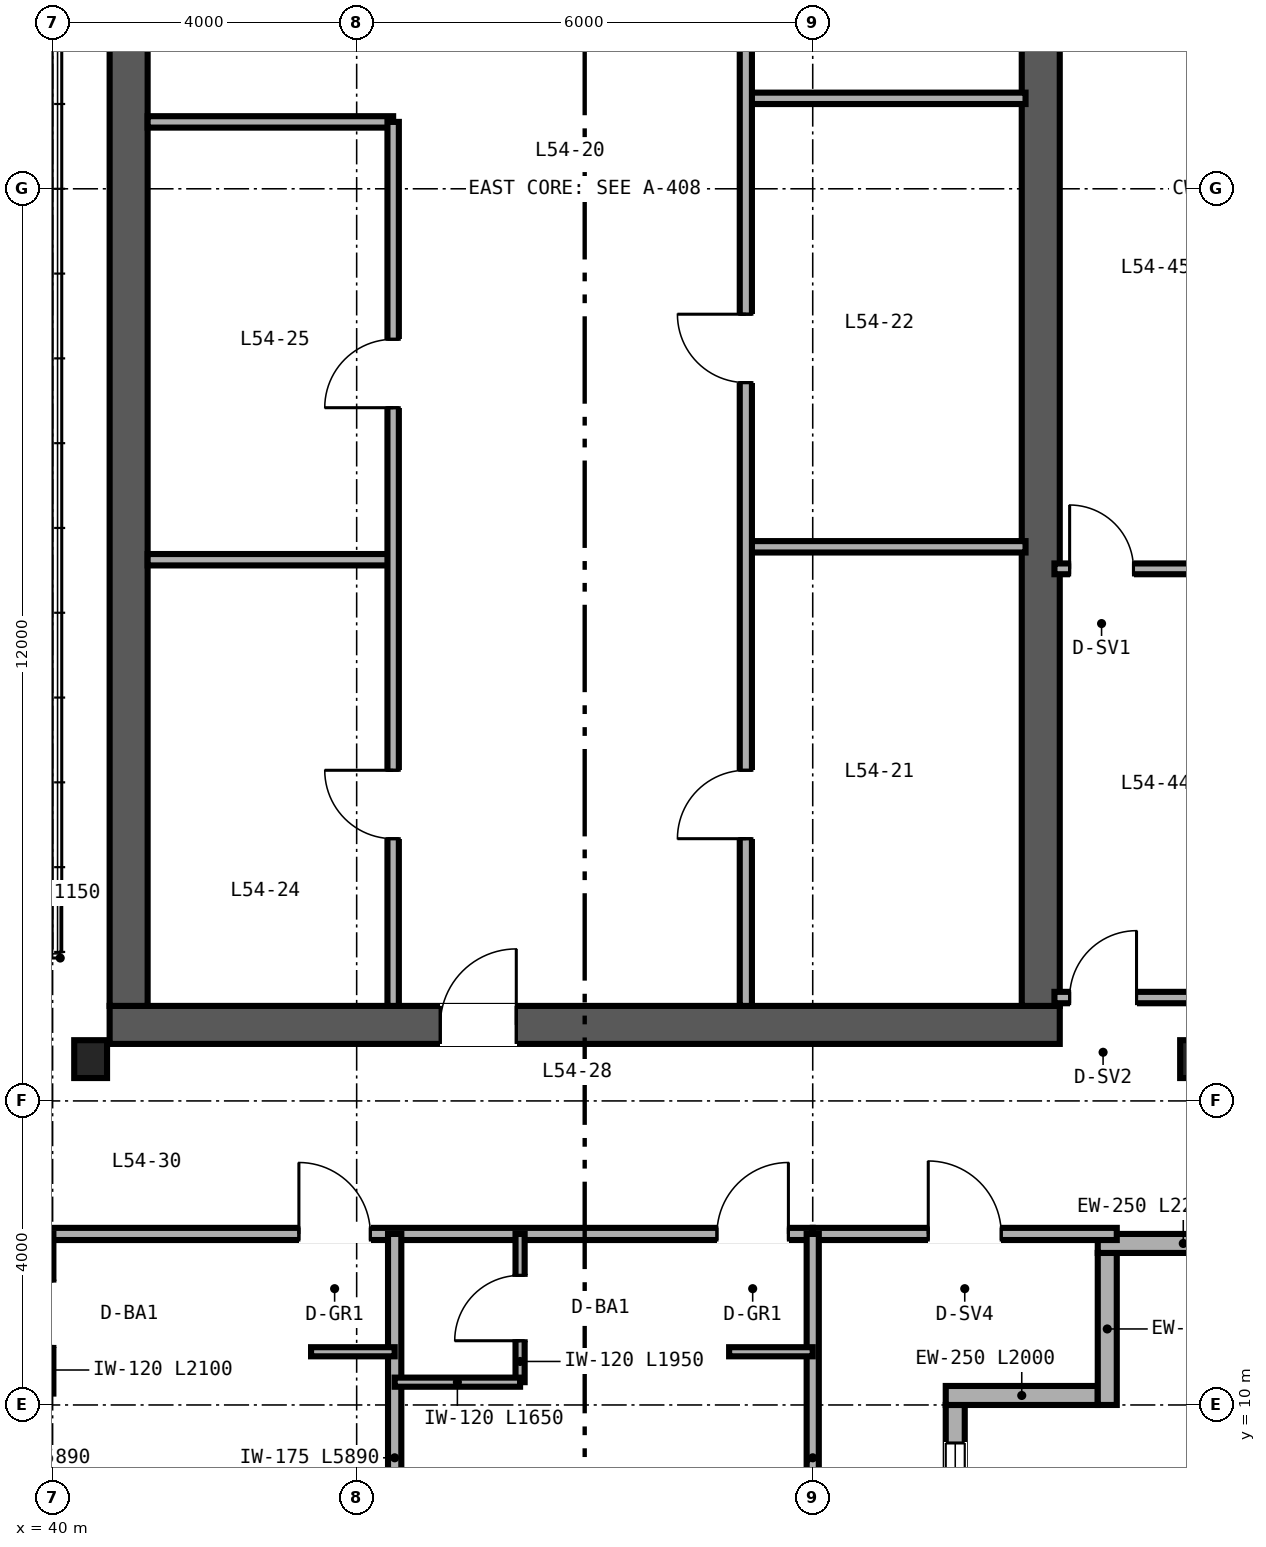
"""IFC4 building model, lengths in metres.
Left out: names, types, materials, properties, quantities, classifications, styles, units other than length and angle.
Written with IfcOpenShell. Run it as: python <this file> out.ifc"""

import sys

from ifc_helpers import new_model, si_unit, direction, frame, frame_2d, origin, origin_2d, place, context, subcontext, project, spatial, rectangle, i_section, extrude, source, transform, mapped, element, fill, save


model = new_model("IFC4")
c1 = context("Model", 3, precision=1e-05, world=origin(), true_north=direction((0.0, 1.0)))
c2 = subcontext(c1, "Body", "Model", "MODEL_VIEW")
j1 = project(units=[si_unit("LENGTHUNIT", "METRE"), si_unit("PLANEANGLEUNIT", "RADIAN")], contexts=[c1])
p1 = place(None, origin())
s1 = spatial("IfcSite", under=j1, at=p1, CompositionType="ELEMENT")
p2 = place(p1, origin())
s2 = spatial("IfcBuilding", under=s1, at=p2, CompositionType="ELEMENT")
p3 = place(p2, frame((0.0, 0.0, 213.6)))
s3 = spatial("IfcBuildingStorey", under=s2, at=p3, CompositionType="ELEMENT", Elevation=213.6)
p4 = place(p3, frame((40.75, 15.0, 0.0), z_axis=(0.0, 0.0, 1.0), x_axis=(1.0, 0.0, 0.0)))
e1 = element("IfcWall", 1, at=p4, inside=s3, PredefinedType="SHEAR", context=c2, shape_type="SweptSolid", body=[
    extrude(rectangle(XDim=12.5, YDim=0.5, at=frame_2d((6.25, 0.0))), origin(), (0.0, 0.0, 1.0), 3.37),
])
p5 = place(p4, frame((4.35, 0.0, 0.0)))
e2 = element("IfcOpeningElement", 2, at=p5, cuts=e1, PredefinedType="OPENING", context=c2, shape_type="SweptSolid", body=[
    extrude(rectangle(XDim=1.0, YDim=2.15, at=frame_2d((0.5, 1.075))), frame((0.0, 0.26, 0.0), z_axis=(0.0, -1.0, 0.0), x_axis=(1.0, 0.0, 0.0)), (0.0, 0.0, 1.0), 0.52),
])
for number, where, z_axis, x_axis in (
    (3, (41.0, 15.25, 0.0), (0.0, 0.0, 1.0), (0.0, 1.0, 0.0)),
    (4, (53.0, 15.25, 0.0), (0.0, 0.0, 1.0), (0.0, 1.0, 0.0)),
):
    element("IfcWall", number, at=place(p3, frame(where, z_axis=z_axis, x_axis=x_axis)), inside=s3, PredefinedType="SHEAR", context=c2, shape_type="SweptSolid", body=[
        extrude(rectangle(XDim=21.5, YDim=0.5, at=frame_2d((10.75, 0.0))), origin(), (0.0, 0.0, 1.0), 3.37),
    ])
m1 = source(origin(), c2, "Body", "SweptSolid", [
    extrude(i_section(OverallWidth=0.432, OverallDepth=0.498, WebThickness=0.056, FlangeThickness=0.089, FilletRadius=0.025, at=origin_2d()), origin(), (0.0, 0.0, 1.0), 3.37),
])
for number, where, z_axis, x_axis in (
    (5, (40.5, 14.55, 0.0), (0.0, 0.0, 1.0), (1.0, 0.0, 0.0)),
    (6, (55.05, 14.55, 0.0), (0.0, 0.0, 1.0), (1.0, 0.0, 0.0)),
):
    element("IfcColumn", number, at=place(p3, frame(where, z_axis=z_axis, x_axis=x_axis)), inside=s3, PredefinedType="COLUMN", context=c2, shape_type="MappedRepresentation", body=[
        mapped(m1, transform((0.0, 0.0, 0.0), scale=1.0)),
    ])
p6 = place(p3, frame((51.875, 8.0, 0.0), z_axis=(0.0, 0.0, 1.0), x_axis=(0.0, 1.0, 0.0)))
e7 = element("IfcWall", 7, at=p6, inside=s3, PredefinedType="SOLIDWALL", context=c2, shape_type="SweptSolid", body=[
    extrude(rectangle(XDim=2.0, YDim=0.25, at=frame_2d((1.0, 0.0))), origin(), (0.0, 0.0, 1.0), 3.37),
])
p7 = place(p6, frame((0.5, 0.0, 0.85)))
e8 = element("IfcOpeningElement", 8, at=p7, cuts=e7, PredefinedType="OPENING", context=c2, shape_type="SweptSolid", body=[
    extrude(rectangle(XDim=1.0, YDim=1.9, at=frame_2d((0.5, 0.95))), frame((0.0, 0.135, 0.0), z_axis=(0.0, -1.0, 0.0), x_axis=(1.0, 0.0, 0.0)), (0.0, 0.0, 1.0), 0.27),
])
for number, where, z_axis, x_axis in (
    (9, (51.75, 10.125, 0.0), (0.0, 0.0, 1.0), (1.0, 0.0, 0.0)),
    (10, (53.875, 10.0, 0.0), (0.0, 0.0, 1.0), (0.0, 1.0, 0.0)),
):
    element("IfcWall", number, at=place(p3, frame(where, z_axis=z_axis, x_axis=x_axis)), inside=s3, PredefinedType="SOLIDWALL", context=c2, shape_type="SweptSolid", body=[
        extrude(rectangle(XDim=2.0, YDim=0.25, at=frame_2d((1.0, 0.0))), origin(), (0.0, 0.0, 1.0), 3.37),
    ])
p8 = place(p3, frame((53.75, 12.125, 0.0), z_axis=(0.0, 0.0, 1.0), x_axis=(1.0, 0.0, 0.0)))
e11 = element("IfcWall", 11, at=p8, inside=s3, PredefinedType="SOLIDWALL", context=c2, shape_type="SweptSolid", body=[
    extrude(rectangle(XDim=2.25, YDim=0.25, at=frame_2d((1.125, 0.0))), origin(), (0.0, 0.0, 1.0), 3.37),
])
for number, where, z_axis, x_axis in (
    (12, (49.12, 21.29, 0.0), (0.0, 0.0, 1.0), (1.0, 0.0, 0.0)),
    (13, (49.12, 27.19, 0.0), (0.0, 0.0, 1.0), (1.0, 0.0, 0.0)),
):
    element("IfcWall", number, at=place(p3, frame(where, z_axis=z_axis, x_axis=x_axis)), inside=s3, PredefinedType="PARTITIONING", context=c2, shape_type="SweptSolid", body=[
        extrude(rectangle(XDim=3.68, YDim=0.15, at=frame_2d((1.84, 0.0))), origin(), (0.0, 0.0, 1.0), 3.37),
    ])
p9 = place(p3, frame((49.12, 15.25, 0.0), z_axis=(0.0, 0.0, 1.0), x_axis=(0.0, 1.0, 0.0)))
e14 = element("IfcWall", 14, at=p9, inside=s3, PredefinedType="PARTITIONING", context=c2, shape_type="SweptSolid", body=[
    extrude(rectangle(XDim=16.13, YDim=0.16, at=frame_2d((8.065, 0.0))), origin(), (0.0, 0.0, 1.0), 2.443),
])
p10 = place(p9, frame((2.2, 0.0, 0.0)))
e15 = element("IfcOpeningElement", 15, at=p10, cuts=e14, PredefinedType="OPENING", context=c2, shape_type="SweptSolid", body=[
    extrude(rectangle(XDim=0.9, YDim=2.15, at=frame_2d((0.45, 1.075))), frame((0.0, 0.09, 0.0), z_axis=(0.0, -1.0, 0.0), x_axis=(1.0, 0.0, 0.0)), (0.0, 0.0, 1.0), 0.18),
])
p11 = place(p9, frame((8.2, 0.0, 0.0)))
e16 = element("IfcOpeningElement", 16, at=p11, cuts=e14, PredefinedType="OPENING", context=c2, shape_type="SweptSolid", body=[
    extrude(rectangle(XDim=0.9, YDim=2.15, at=frame_2d((0.45, 1.075))), frame((0.0, 0.09, 0.0), z_axis=(0.0, -1.0, 0.0), x_axis=(1.0, 0.0, 0.0)), (0.0, 0.0, 1.0), 0.18),
])
p12 = place(p9, frame((13.5, 0.0, 0.0)))
e17 = element("IfcOpeningElement", 17, at=p12, cuts=e14, PredefinedType="OPENING", context=c2, shape_type="SweptSolid", body=[
    extrude(rectangle(XDim=0.9, YDim=2.15, at=frame_2d((0.45, 1.075))), frame((0.0, 0.09, 0.0), z_axis=(0.0, -1.0, 0.0), x_axis=(1.0, 0.0, 0.0)), (0.0, 0.0, 1.0), 0.18),
])
for number, where, z_axis, x_axis in (
    (18, (41.25, 26.88, 0.0), (0.0, 0.0, 1.0), (1.0, 0.0, 0.0)),
    (19, (41.25, 21.12, 0.0), (0.0, 0.0, 1.0), (1.0, 0.0, 0.0)),
):
    element("IfcWall", number, at=place(p3, frame(where, z_axis=z_axis, x_axis=x_axis)), inside=s3, PredefinedType="PARTITIONING", context=c2, shape_type="SweptSolid", body=[
        extrude(rectangle(XDim=3.23, YDim=0.15, at=frame_2d((1.615, 0.0))), origin(), (0.0, 0.0, 1.0), 3.37),
    ])
p13 = place(p3, frame((44.48, 15.25, 0.0), z_axis=(0.0, 0.0, 1.0), x_axis=(0.0, 1.0, 0.0)))
e20 = element("IfcWall", 20, at=p13, inside=s3, PredefinedType="PARTITIONING", context=c2, shape_type="SweptSolid", body=[
    extrude(rectangle(XDim=11.63, YDim=0.15, at=frame_2d((5.815, 0.0))), origin(), (0.0, 0.0, 1.0), 3.37),
])
p14 = place(p13, frame((2.2, 0.0, 0.0)))
e21 = element("IfcOpeningElement", 21, at=p14, cuts=e20, PredefinedType="OPENING", context=c2, shape_type="SweptSolid", body=[
    extrude(rectangle(XDim=0.9, YDim=2.15, at=frame_2d((0.45, 1.075))), frame((0.0, 0.085, 0.0), z_axis=(0.0, -1.0, 0.0), x_axis=(1.0, 0.0, 0.0)), (0.0, 0.0, 1.0), 0.17),
])
p15 = place(p13, frame((7.87, 0.0, 0.0)))
e22 = element("IfcOpeningElement", 22, at=p15, cuts=e20, PredefinedType="OPENING", context=c2, shape_type="SweptSolid", body=[
    extrude(rectangle(XDim=0.9, YDim=2.15, at=frame_2d((0.45, 1.075))), frame((0.0, 0.085, 0.0), z_axis=(0.0, -1.0, 0.0), x_axis=(1.0, 0.0, 0.0)), (0.0, 0.0, 1.0), 0.17),
])
p16 = place(p3, frame((53.18, 15.36, 0.0), z_axis=(0.0, 0.0, 1.0), x_axis=(1.0, 0.0, 0.0)))
e23 = element("IfcWall", 23, at=p16, inside=s3, PredefinedType="PARTITIONING", context=c2, shape_type="SweptSolid", body=[
    extrude(rectangle(XDim=2.66, YDim=0.15, at=frame_2d((1.33, 0.0))), origin(), (0.0, 0.0, 1.0), 2.591),
])
p17 = place(p16, frame((0.2, 0.0, 0.0)))
e24 = element("IfcOpeningElement", 24, at=p17, cuts=e23, PredefinedType="OPENING", context=c2, shape_type="SweptSolid", body=[
    extrude(rectangle(XDim=0.88, YDim=2.15, at=frame_2d((0.44, 1.075))), frame((0.0, 0.085, 0.0), z_axis=(0.0, -1.0, 0.0), x_axis=(1.0, 0.0, 0.0)), (0.0, 0.0, 1.0), 0.17),
])
p18 = place(p3, frame((53.18, 21.0, 0.0), z_axis=(0.0, 0.0, 1.0), x_axis=(1.0, 0.0, 0.0)))
e25 = element("IfcWall", 25, at=p18, inside=s3, PredefinedType="PARTITIONING", context=c2, shape_type="SweptSolid", body=[
    extrude(rectangle(XDim=2.66, YDim=0.142, at=frame_2d((1.33, 0.0))), origin(), (0.0, 0.0, 1.0), 2.591),
])
p19 = place(p18, frame((0.2, 0.0, 0.0)))
e26 = element("IfcOpeningElement", 26, at=p19, cuts=e25, PredefinedType="OPENING", context=c2, shape_type="SweptSolid", body=[
    extrude(rectangle(XDim=0.84, YDim=2.1, at=frame_2d((0.42, 1.05))), frame((0.0, 0.081, 0.0), z_axis=(0.0, -1.0, 0.0), x_axis=(1.0, 0.0, 0.0)), (0.0, 0.0, 1.0), 0.162),
])
p20 = place(p3, frame((50.0, 12.25, 0.0), z_axis=(0.0, 0.0, 1.0), x_axis=(1.0, 0.0, 0.0)))
e27 = element("IfcWall", 27, at=p20, inside=s3, PredefinedType="PARTITIONING", context=c2, shape_type="SweptSolid", body=[
    extrude(rectangle(XDim=4.0, YDim=0.16, at=frame_2d((2.0, 0.0))), origin(), (0.0, 0.0, 1.0), 3.37),
])
p21 = place(p20, frame((1.52, 0.0, 0.0)))
e28 = element("IfcOpeningElement", 28, at=p21, cuts=e27, PredefinedType="OPENING", context=c2, shape_type="SweptSolid", body=[
    extrude(rectangle(XDim=0.96, YDim=2.15, at=frame_2d((0.48, 1.075))), frame((0.0, 0.09, 0.0), z_axis=(0.0, -1.0, 0.0), x_axis=(1.0, 0.0, 0.0)), (0.0, 0.0, 1.0), 0.18),
])
p22 = place(p3, frame((38.0, 12.25, 0.0), z_axis=(0.0, 0.0, 1.0), x_axis=(1.0, 0.0, 0.0)))
e29 = element("IfcWall", 29, at=p22, inside=s3, PredefinedType="PARTITIONING", context=c2, shape_type="SweptSolid", body=[
    extrude(rectangle(XDim=12.0, YDim=0.16, at=frame_2d((6.0, 0.0))), origin(), (0.0, 0.0, 1.0), 2.913),
])
p23 = place(p22, frame((5.24, 0.0, 0.0)))
e30 = element("IfcOpeningElement", 30, at=p23, cuts=e29, PredefinedType="OPENING", context=c2, shape_type="SweptSolid", body=[
    extrude(rectangle(XDim=0.94, YDim=2.15, at=frame_2d((0.47, 1.075))), frame((0.0, 0.09, 0.0), z_axis=(0.0, -1.0, 0.0), x_axis=(1.0, 0.0, 0.0)), (0.0, 0.0, 1.0), 0.18),
])
p24 = place(p22, frame((10.74, 0.0, 0.0)))
e31 = element("IfcOpeningElement", 31, at=p24, cuts=e29, PredefinedType="OPENING", context=c2, shape_type="SweptSolid", body=[
    extrude(rectangle(XDim=0.94, YDim=2.15, at=frame_2d((0.47, 1.075))), frame((0.0, 0.09, 0.0), z_axis=(0.0, -1.0, 0.0), x_axis=(1.0, 0.0, 0.0)), (0.0, 0.0, 1.0), 0.18),
])
p25 = place(p3, frame((50.0, 6.36, 0.0), z_axis=(0.0, 0.0, 1.0), x_axis=(0.0, 1.0, 0.0)))
e32 = element("IfcWall", 32, at=p25, inside=s3, PredefinedType="PARTITIONING", context=c2, shape_type="SweptSolid", body=[
    extrude(rectangle(XDim=5.89, YDim=0.16, at=frame_2d((2.945, 0.0))), origin(), (0.0, 0.0, 1.0), 2.677),
])
p26 = place(p3, frame((44.5, 6.36, 0.0), z_axis=(0.0, 0.0, 1.0), x_axis=(0.0, 1.0, 0.0)))
e33 = element("IfcWall", 33, at=p26, inside=s3, PredefinedType="PARTITIONING", context=c2, shape_type="SweptSolid", body=[
    extrude(rectangle(XDim=5.89, YDim=0.175, at=frame_2d((2.945, 0.0))), origin(), (0.0, 0.0, 1.0), 2.677),
])
p27 = place(p3, frame((39.95, 10.15, 0.0), z_axis=(0.0, 0.0, 1.0), x_axis=(0.0, 1.0, 0.0)))
e34 = element("IfcWall", 34, at=p27, inside=s3, PredefinedType="PARTITIONING", context=c2, shape_type="SweptSolid", body=[
    extrude(rectangle(XDim=2.1, YDim=0.12, at=frame_2d((1.05, 0.0))), origin(), (0.0, 0.0, 1.0), 3.37),
])
p28 = place(p27, frame((0.62, 0.0, 0.0)))
e35 = element("IfcOpeningElement", 35, at=p28, cuts=e34, PredefinedType="OPENING", context=c2, shape_type="SweptSolid", body=[
    extrude(rectangle(XDim=0.86, YDim=2.1, at=frame_2d((0.43, 1.05))), frame((0.0, 0.07, 0.0), z_axis=(0.0, -1.0, 0.0), x_axis=(1.0, 0.0, 0.0)), (0.0, 0.0, 1.0), 0.14),
])
p29 = place(p3, frame((43.4, 10.7, 0.0), z_axis=(0.0, 0.0, 1.0), x_axis=(1.0, 0.0, 0.0)))
e36 = element("IfcWall", 36, at=p29, inside=s3, PredefinedType="PARTITIONING", context=c2, shape_type="SweptSolid", body=[
    extrude(rectangle(XDim=1.1, YDim=0.12, at=frame_2d((0.55, 0.0))), origin(), (0.0, 0.0, 1.0), 3.37),
])
p30 = place(p3, frame((46.15, 10.3, 0.0), z_axis=(0.0, 0.0, 1.0), x_axis=(0.0, 1.0, 0.0)))
e37 = element("IfcWall", 37, at=p30, inside=s3, PredefinedType="PARTITIONING", context=c2, shape_type="SweptSolid", body=[
    extrude(rectangle(XDim=1.95, YDim=0.12, at=frame_2d((0.975, 0.0))), origin(), (0.0, 0.0, 1.0), 3.37),
])
p31 = place(p30, frame((0.545, 0.0, 0.0)))
e38 = element("IfcOpeningElement", 38, at=p31, cuts=e37, PredefinedType="OPENING", context=c2, shape_type="SweptSolid", body=[
    extrude(rectangle(XDim=0.86, YDim=2.1, at=frame_2d((0.43, 1.05))), frame((0.0, 0.07, 0.0), z_axis=(0.0, -1.0, 0.0), x_axis=(1.0, 0.0, 0.0)), (0.0, 0.0, 1.0), 0.14),
])
p32 = place(p3, frame((44.5, 10.3, 0.0), z_axis=(0.0, 0.0, 1.0), x_axis=(1.0, 0.0, 0.0)))
e39 = element("IfcWall", 39, at=p32, inside=s3, PredefinedType="PARTITIONING", context=c2, shape_type="SweptSolid", body=[
    extrude(rectangle(XDim=1.65, YDim=0.12, at=frame_2d((0.825, 0.0))), origin(), (0.0, 0.0, 1.0), 3.37),
])
p33 = place(p3, frame((48.9, 10.7, 0.0), z_axis=(0.0, 0.0, 1.0), x_axis=(1.0, 0.0, 0.0)))
e40 = element("IfcWall", 40, at=p33, inside=s3, PredefinedType="PARTITIONING", context=c2, shape_type="SweptSolid", body=[
    extrude(rectangle(XDim=1.1, YDim=0.12, at=frame_2d((0.55, 0.0))), origin(), (0.0, 0.0, 1.0), 3.37),
])
m2 = source(origin(), c2, "Body", "SweptSolid", [
    extrude(rectangle(XDim=1.0, YDim=1.9, at=frame_2d((0.5, 0.95))), frame((0.0, 0.03, 0.0), z_axis=(0.0, -1.0, 0.0), x_axis=(1.0, 0.0, 0.0)), (0.0, 0.0, 1.0), 0.06),
])
p34 = place(p7, origin())
e41 = element("IfcWindow", 41, at=p34, inside=s3, PartitioningType="SINGLE_PANEL", PredefinedType="WINDOW", context=c2, shape_type="MappedRepresentation", body=[
    mapped(m2, transform((0.0, 0.0, 0.0), scale=1.0)),
])
fill(e8, e41)
m3 = source(origin(), c2, "Body", "SweptSolid", [
    extrude(rectangle(XDim=1.0, YDim=2.15, at=frame_2d((0.5, 1.075))), frame((0.0, 0.025, 0.0), z_axis=(0.0, -1.0, 0.0), x_axis=(1.0, 0.0, 0.0)), (0.0, 0.0, 1.0), 0.05),
])
p35 = place(p5, origin())
e42 = element("IfcDoor", 42, at=p35, inside=s3, OperationType="SINGLE_SWING_RIGHT", PredefinedType="DOOR", context=c2, shape_type="MappedRepresentation", body=[
    mapped(m3, transform((0.0, 0.0, 0.0), scale=1.0)),
])
fill(e2, e42)
m4 = source(origin(), c2, "Body", "SweptSolid", [
    extrude(rectangle(XDim=0.9, YDim=2.15, at=frame_2d((0.45, 1.075))), frame((0.0, 0.025, 0.0), z_axis=(0.0, -1.0, 0.0), x_axis=(1.0, 0.0, 0.0)), (0.0, 0.0, 1.0), 0.05),
])
p36 = place(p10, origin())
e43 = element("IfcDoor", 43, at=p36, inside=s3, OperationType="SINGLE_SWING_LEFT", PredefinedType="DOOR", context=c2, shape_type="MappedRepresentation", body=[
    mapped(m4, transform((0.0, 0.0, 0.0), scale=1.0)),
])
fill(e15, e43)
p37 = place(p11, origin())
e44 = element("IfcDoor", 44, at=p37, inside=s3, OperationType="SINGLE_SWING_RIGHT", PredefinedType="DOOR", context=c2, shape_type="MappedRepresentation", body=[
    mapped(m4, transform((0.0, 0.0, 0.0), scale=1.0)),
])
fill(e16, e44)
p38 = place(p14, origin())
e45 = element("IfcDoor", 45, at=p38, inside=s3, OperationType="SINGLE_SWING_RIGHT", PredefinedType="DOOR", context=c2, shape_type="MappedRepresentation", body=[
    mapped(m4, transform((0.0, 0.0, 0.0), scale=1.0)),
])
fill(e21, e45)
p39 = place(p15, origin())
e46 = element("IfcDoor", 46, at=p39, inside=s3, OperationType="SINGLE_SWING_LEFT", PredefinedType="DOOR", context=c2, shape_type="MappedRepresentation", body=[
    mapped(m4, transform((0.0, 0.0, 0.0), scale=1.0)),
])
fill(e22, e46)
m5 = source(origin(), c2, "Body", "SweptSolid", [
    extrude(rectangle(XDim=0.88, YDim=2.15, at=frame_2d((0.44, 1.075))), frame((0.0, 0.025, 0.0), z_axis=(0.0, -1.0, 0.0), x_axis=(1.0, 0.0, 0.0)), (0.0, 0.0, 1.0), 0.05),
])
p40 = place(p17, origin())
e47 = element("IfcDoor", 47, at=p40, inside=s3, OperationType="SINGLE_SWING_RIGHT", PredefinedType="DOOR", context=c2, shape_type="MappedRepresentation", body=[
    mapped(m5, transform((0.0, 0.0, 0.0), scale=1.0)),
])
fill(e24, e47)
m6 = source(origin(), c2, "Body", "SweptSolid", [
    extrude(rectangle(XDim=0.84, YDim=2.1, at=frame_2d((0.42, 1.05))), frame((0.0, 0.025, 0.0), z_axis=(0.0, -1.0, 0.0), x_axis=(1.0, 0.0, 0.0)), (0.0, 0.0, 1.0), 0.05),
])
p41 = place(p19, origin())
e48 = element("IfcDoor", 48, at=p41, inside=s3, OperationType="SINGLE_SWING_LEFT", PredefinedType="DOOR", context=c2, shape_type="MappedRepresentation", body=[
    mapped(m6, transform((0.0, 0.0, 0.0), scale=1.0)),
])
fill(e26, e48)
m7 = source(origin(), c2, "Body", "SweptSolid", [
    extrude(rectangle(XDim=0.96, YDim=2.15, at=frame_2d((0.48, 1.075))), frame((0.0, 0.025, 0.0), z_axis=(0.0, -1.0, 0.0), x_axis=(1.0, 0.0, 0.0)), (0.0, 0.0, 1.0), 0.05),
])
p42 = place(p21, origin())
e49 = element("IfcDoor", 49, at=p42, inside=s3, OperationType="SINGLE_SWING_LEFT", PredefinedType="DOOR", context=c2, shape_type="MappedRepresentation", body=[
    mapped(m7, transform((0.0, 0.0, 0.0), scale=1.0)),
])
fill(e28, e49)
m8 = source(origin(), c2, "Body", "SweptSolid", [
    extrude(rectangle(XDim=0.86, YDim=2.1, at=frame_2d((0.43, 1.05))), frame((0.0, 0.025, 0.0), z_axis=(0.0, -1.0, 0.0), x_axis=(1.0, 0.0, 0.0)), (0.0, 0.0, 1.0), 0.05),
])
p43 = place(p31, origin())
e50 = element("IfcDoor", 50, at=p43, inside=s3, OperationType="SINGLE_SWING_LEFT", PredefinedType="DOOR", context=c2, shape_type="MappedRepresentation", body=[
    mapped(m8, transform((0.0, 0.0, 0.0), scale=1.0)),
])
fill(e38, e50)
m9 = source(origin(), c2, "Body", "SweptSolid", [
    extrude(rectangle(XDim=0.94, YDim=2.15, at=frame_2d((0.47, 1.075))), frame((0.0, 0.025, 0.0), z_axis=(0.0, -1.0, 0.0), x_axis=(1.0, 0.0, 0.0)), (0.0, 0.0, 1.0), 0.05),
])
p44 = place(p23, origin())
e51 = element("IfcDoor", 51, at=p44, inside=s3, OperationType="SINGLE_SWING_LEFT", PredefinedType="DOOR", context=c2, shape_type="MappedRepresentation", body=[
    mapped(m9, transform((0.0, 0.0, 0.0), scale=1.0)),
])
fill(e30, e51)
p45 = place(p24, origin())
e52 = element("IfcDoor", 52, at=p45, inside=s3, OperationType="SINGLE_SWING_RIGHT", PredefinedType="DOOR", context=c2, shape_type="MappedRepresentation", body=[
    mapped(m9, transform((0.0, 0.0, 0.0), scale=1.0)),
])
fill(e31, e52)
save(model, sys.argv[1])
